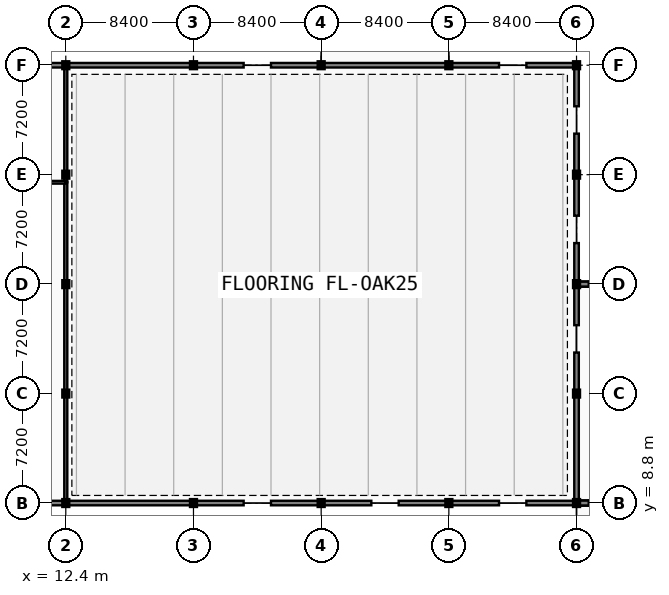
"""IFC4 building model, lengths in metres.
Left out: names, types, materials, properties, quantities, classifications, styles, units other than length and angle.
Written with IfcOpenShell. Run it as: python <this file> out.ifc"""

import sys

from ifc_helpers import new_model, si_unit, direction, frame, frame_2d, origin, origin_2d, place, context, subcontext, project, spatial, rectangle, i_section, extrude, element, fill, save


model = new_model("IFC4")
c1 = context("Model", 3, precision=1e-05, world=origin(), true_north=direction((0.0, 1.0)))
c2 = subcontext(c1, "Body", "Model", "MODEL_VIEW")
j1 = project(units=[si_unit("LENGTHUNIT", "METRE"), si_unit("PLANEANGLEUNIT", "RADIAN")], contexts=[c1])
p1 = place(None, origin())
s1 = spatial("IfcSite", under=j1, at=p1, CompositionType="ELEMENT")
p2 = place(p1, origin())
s2 = spatial("IfcBuilding", under=s1, at=p2, CompositionType="ELEMENT")
p3 = place(p2, frame((0.0, 0.0, 5.4)))
s3 = spatial("IfcBuildingStorey", under=s2, at=p3, CompositionType="ELEMENT", Elevation=5.4)
for number, where, z_axis, x_axis in (
    (1, (12.4, 8.8, 0.0), (0.0, 0.0, 1.0), (1.0, 0.0, 0.0)),
    (2, (12.4, 16.0, 0.0), (0.0, 0.0, 1.0), (1.0, 0.0, 0.0)),
    (3, (12.4, 23.2, 0.0), (0.0, 0.0, 1.0), (1.0, 0.0, 0.0)),
    (4, (12.4, 30.4, 0.0), (0.0, 0.0, 1.0), (1.0, 0.0, 0.0)),
    (5, (12.4, 37.6, 0.0), (0.0, 0.0, 1.0), (1.0, 0.0, 0.0)),
    (6, (20.8, 8.8, 0.0), (0.0, 0.0, 1.0), (1.0, 0.0, 0.0)),
    (7, (20.8, 37.6, 0.0), (0.0, 0.0, 1.0), (1.0, 0.0, 0.0)),
    (8, (29.2, 8.8, 0.0), (0.0, 0.0, 1.0), (1.0, 0.0, 0.0)),
    (9, (29.2, 37.6, 0.0), (0.0, 0.0, 1.0), (1.0, 0.0, 0.0)),
    (10, (37.6, 8.8, 0.0), (0.0, 0.0, 1.0), (1.0, 0.0, 0.0)),
    (11, (37.6, 37.6, 0.0), (0.0, 0.0, 1.0), (1.0, 0.0, 0.0)),
    (12, (46.0, 8.8, 0.0), (0.0, 0.0, 1.0), (1.0, 0.0, 0.0)),
    (13, (46.0, 16.0, 0.0), (0.0, 0.0, 1.0), (1.0, 0.0, 0.0)),
    (14, (46.0, 23.2, 0.0), (0.0, 0.0, 1.0), (1.0, 0.0, 0.0)),
    (15, (46.0, 30.4, 0.0), (0.0, 0.0, 1.0), (1.0, 0.0, 0.0)),
    (16, (46.0, 37.6, 0.0), (0.0, 0.0, 1.0), (1.0, 0.0, 0.0)),
):
    element("IfcColumn", number, at=place(p3, frame(where, z_axis=z_axis, x_axis=x_axis)), inside=s3, PredefinedType="COLUMN", context=c2, shape_type="SweptSolid", body=[
        extrude(i_section(OverallWidth=0.3, OverallDepth=0.36, WebThickness=0.012, FlangeThickness=0.022, at=origin_2d()), origin(), (0.0, 0.0, 1.0), 4.2),
    ])
p4 = place(p3, frame((12.4, 8.96, 0.0), z_axis=(0.0, 0.0, 1.0), x_axis=(0.0, 1.0, 0.0)))
e17 = element("IfcWall", 17, at=p4, inside=s3, PredefinedType="PARTITIONING", context=c2, shape_type="SweptSolid", body=[
    extrude(rectangle(XDim=20.94, YDim=0.2, at=frame_2d((10.47, 0.0))), origin(), (0.0, 0.0, 1.0), 3.35),
])
p5 = place(p4, frame((8.613, 0.0, -0.01)))
e18 = element("IfcOpeningElement", 18, at=p5, cuts=e17, PredefinedType="OPENING", context=c2, shape_type="SweptSolid", body=[
    extrude(rectangle(XDim=1.8, YDim=2.26, at=frame_2d((0.9, 1.13))), frame((0.0, 0.11, 0.0), z_axis=(0.0, -1.0, 0.0), x_axis=(1.0, 0.0, 0.0)), (0.0, 0.0, 1.0), 0.22),
])
p6 = place(p3, frame((12.4, 29.9, 0.0), z_axis=(0.0, 0.0, 1.0), x_axis=(0.0, 1.0, 0.0)))
e19 = element("IfcWall", 19, at=p6, inside=s3, PredefinedType="PARTITIONING", context=c2, shape_type="SweptSolid", body=[
    extrude(rectangle(XDim=7.56, YDim=0.2, at=frame_2d((3.78, 0.0))), origin(), (0.0, 0.0, 1.0), 3.23),
])
p7 = place(p3, frame((8.3, 29.9, 0.0), z_axis=(0.0, 0.0, 1.0), x_axis=(1.0, 0.0, 0.0)))
e20 = element("IfcWall", 20, at=p7, inside=s3, PredefinedType="PARTITIONING", context=c2, shape_type="SweptSolid", body=[
    extrude(rectangle(XDim=4.1, YDim=0.18, at=frame_2d((2.05, 0.0))), origin(), (0.0, 0.0, 1.0), 3.35),
])
p8 = place(p7, frame((1.55, 0.0, -0.01)))
e21 = element("IfcOpeningElement", 21, at=p8, cuts=e20, PredefinedType="OPENING", context=c2, shape_type="SweptSolid", body=[
    extrude(rectangle(XDim=1.0, YDim=2.16, at=frame_2d((0.5, 1.08))), frame((0.0, 0.1, 0.0), z_axis=(0.0, -1.0, 0.0), x_axis=(1.0, 0.0, 0.0)), (0.0, 0.0, 1.0), 0.2),
])
p9 = place(p3, frame((4.0, 8.8, 0.0), z_axis=(0.0, 0.0, 1.0), x_axis=(1.0, 0.0, 0.0)))
e22 = element("IfcWall", 22, at=p9, inside=s3, PredefinedType="SOLIDWALL", context=c2, shape_type="SweptSolid", body=[
    extrude(rectangle(XDim=8.4, YDim=0.3, at=frame_2d((4.2, 0.0))), origin(), (0.0, 0.0, 1.0), 3.35),
])
p10 = place(p9, frame((0.46, 0.0, 0.85)))
e23 = element("IfcOpeningElement", 23, at=p10, cuts=e22, PredefinedType="OPENING", context=c2, shape_type="SweptSolid", body=[
    extrude(rectangle(XDim=0.9, YDim=2.15, at=frame_2d((0.45, 1.075))), frame((0.0, 0.16, 0.0), z_axis=(0.0, -1.0, 0.0), x_axis=(1.0, 0.0, 0.0)), (0.0, 0.0, 1.0), 0.32),
])
p11 = place(p9, frame((6.86, 0.0, 0.85)))
e24 = element("IfcOpeningElement", 24, at=p11, cuts=e22, PredefinedType="OPENING", context=c2, shape_type="SweptSolid", body=[
    extrude(rectangle(XDim=0.9, YDim=2.15, at=frame_2d((0.45, 1.075))), frame((0.0, 0.16, 0.0), z_axis=(0.0, -1.0, 0.0), x_axis=(1.0, 0.0, 0.0)), (0.0, 0.0, 1.0), 0.32),
])
p12 = place(p3, frame((12.4, 8.8, 0.0), z_axis=(0.0, 0.0, 1.0), x_axis=(1.0, 0.0, 0.0)))
e25 = element("IfcWall", 25, at=p12, inside=s3, PredefinedType="SOLIDWALL", context=c2, shape_type="SweptSolid", body=[
    extrude(rectangle(XDim=8.4, YDim=0.3, at=frame_2d((4.2, 0.0))), origin(), (0.0, 0.0, 1.0), 3.35),
])
p13 = place(p12, frame((0.46, 0.0, 0.85)))
e26 = element("IfcOpeningElement", 26, at=p13, cuts=e25, PredefinedType="OPENING", context=c2, shape_type="SweptSolid", body=[
    extrude(rectangle(XDim=0.9, YDim=2.15, at=frame_2d((0.45, 1.075))), frame((0.0, 0.16, 0.0), z_axis=(0.0, -1.0, 0.0), x_axis=(1.0, 0.0, 0.0)), (0.0, 0.0, 1.0), 0.32),
])
p14 = place(p12, frame((6.86, 0.0, 0.85)))
e27 = element("IfcOpeningElement", 27, at=p14, cuts=e25, PredefinedType="OPENING", context=c2, shape_type="SweptSolid", body=[
    extrude(rectangle(XDim=0.9, YDim=2.15, at=frame_2d((0.45, 1.075))), frame((0.0, 0.16, 0.0), z_axis=(0.0, -1.0, 0.0), x_axis=(1.0, 0.0, 0.0)), (0.0, 0.0, 1.0), 0.32),
])
for number, where, z_axis, x_axis in (
    (28, (20.8, 8.8, 0.0), (0.0, 0.0, 1.0), (1.0, 0.0, 0.0)),
    (29, (25.9, 8.8, 0.0), (0.0, 0.0, 1.0), (1.0, 0.0, 0.0)),
    (30, (29.2, 8.8, 0.0), (0.0, 0.0, 1.0), (1.0, 0.0, 0.0)),
    (31, (34.3, 8.8, 0.0), (0.0, 0.0, 1.0), (1.0, 0.0, 0.0)),
):
    element("IfcWall", number, at=place(p3, frame(where, z_axis=z_axis, x_axis=x_axis)), inside=s3, PredefinedType="SOLIDWALL", context=c2, shape_type="SweptSolid", body=[
        extrude(rectangle(XDim=3.3, YDim=0.3, at=frame_2d((1.65, 0.0))), origin(), (0.0, 0.0, 1.0), 4.2),
    ])
p15 = place(p3, frame((37.6, 8.8, 0.0), z_axis=(0.0, 0.0, 1.0), x_axis=(1.0, 0.0, 0.0)))
e32 = element("IfcWall", 32, at=p15, inside=s3, PredefinedType="SOLIDWALL", context=c2, shape_type="SweptSolid", body=[
    extrude(rectangle(XDim=3.3, YDim=0.3, at=frame_2d((1.65, 0.0))), origin(), (0.0, 0.0, 1.0), 4.2),
])
p16 = place(p3, frame((42.7, 8.8, 0.0), z_axis=(0.0, 0.0, 1.0), x_axis=(1.0, 0.0, 0.0)))
e33 = element("IfcWall", 33, at=p16, inside=s3, PredefinedType="SOLIDWALL", context=c2, shape_type="SweptSolid", body=[
    extrude(rectangle(XDim=3.3, YDim=0.3, at=frame_2d((1.65, 0.0))), origin(), (0.0, 0.0, 1.0), 4.2),
])
p17 = place(p3, frame((12.4, 37.6, 0.0), z_axis=(0.0, 0.0, 1.0), x_axis=(-1.0, 0.0, 0.0)))
e34 = element("IfcWall", 34, at=p17, inside=s3, PredefinedType="SOLIDWALL", context=c2, shape_type="SweptSolid", body=[
    extrude(rectangle(XDim=8.4, YDim=0.3, at=frame_2d((4.2, 0.0))), origin(), (0.0, 0.0, 1.0), 3.35),
])
p18 = place(p17, frame((0.46, 0.0, 0.85)))
e35 = element("IfcOpeningElement", 35, at=p18, cuts=e34, PredefinedType="OPENING", context=c2, shape_type="SweptSolid", body=[
    extrude(rectangle(XDim=0.9, YDim=2.15, at=frame_2d((0.45, 1.075))), frame((0.0, 0.16, 0.0), z_axis=(0.0, -1.0, 0.0), x_axis=(1.0, 0.0, 0.0)), (0.0, 0.0, 1.0), 0.32),
])
p19 = place(p17, frame((6.86, 0.0, 0.85)))
e36 = element("IfcOpeningElement", 36, at=p19, cuts=e34, PredefinedType="OPENING", context=c2, shape_type="SweptSolid", body=[
    extrude(rectangle(XDim=0.9, YDim=2.15, at=frame_2d((0.45, 1.075))), frame((0.0, 0.16, 0.0), z_axis=(0.0, -1.0, 0.0), x_axis=(1.0, 0.0, 0.0)), (0.0, 0.0, 1.0), 0.32),
])
p20 = place(p3, frame((20.8, 37.6, 0.0), z_axis=(0.0, 0.0, 1.0), x_axis=(-1.0, 0.0, 0.0)))
e37 = element("IfcWall", 37, at=p20, inside=s3, PredefinedType="SOLIDWALL", context=c2, shape_type="SweptSolid", body=[
    extrude(rectangle(XDim=8.4, YDim=0.3, at=frame_2d((4.2, 0.0))), origin(), (0.0, 0.0, 1.0), 3.35),
])
p21 = place(p20, frame((0.46, 0.0, 0.85)))
e38 = element("IfcOpeningElement", 38, at=p21, cuts=e37, PredefinedType="OPENING", context=c2, shape_type="SweptSolid", body=[
    extrude(rectangle(XDim=0.9, YDim=2.15, at=frame_2d((0.45, 1.075))), frame((0.0, 0.16, 0.0), z_axis=(0.0, -1.0, 0.0), x_axis=(1.0, 0.0, 0.0)), (0.0, 0.0, 1.0), 0.32),
])
p22 = place(p20, frame((6.86, 0.0, 0.85)))
e39 = element("IfcOpeningElement", 39, at=p22, cuts=e37, PredefinedType="OPENING", context=c2, shape_type="SweptSolid", body=[
    extrude(rectangle(XDim=0.9, YDim=2.15, at=frame_2d((0.45, 1.075))), frame((0.0, 0.16, 0.0), z_axis=(0.0, -1.0, 0.0), x_axis=(1.0, 0.0, 0.0)), (0.0, 0.0, 1.0), 0.32),
])
for number, where, z_axis, x_axis in (
    (40, (29.2, 37.6, 0.0), (0.0, 0.0, 1.0), (-1.0, 0.0, 0.0)),
    (41, (24.1, 37.6, 0.0), (0.0, 0.0, 1.0), (-1.0, 0.0, 0.0)),
):
    element("IfcWall", number, at=place(p3, frame(where, z_axis=z_axis, x_axis=x_axis)), inside=s3, PredefinedType="SOLIDWALL", context=c2, shape_type="SweptSolid", body=[
        extrude(rectangle(XDim=3.3, YDim=0.3, at=frame_2d((1.65, 0.0))), origin(), (0.0, 0.0, 1.0), 4.2),
    ])
p23 = place(p3, frame((37.6, 37.6, 0.0), z_axis=(0.0, 0.0, 1.0), x_axis=(-1.0, 0.0, 0.0)))
e42 = element("IfcWall", 42, at=p23, inside=s3, PredefinedType="SOLIDWALL", context=c2, shape_type="SweptSolid", body=[
    extrude(rectangle(XDim=8.4, YDim=0.3, at=frame_2d((4.2, 0.0))), origin(), (0.0, 0.0, 1.0), 3.21),
])
p24 = place(p23, frame((3.6, 0.0, -0.01)))
e43 = element("IfcOpeningElement", 43, at=p24, cuts=e42, PredefinedType="OPENING", context=c2, shape_type="SweptSolid", body=[
    extrude(rectangle(XDim=1.2, YDim=2.21, at=frame_2d((0.6, 1.105))), frame((0.0, 0.16, 0.0), z_axis=(0.0, -1.0, 0.0), x_axis=(1.0, 0.0, 0.0)), (0.0, 0.0, 1.0), 0.32),
])
p25 = place(p3, frame((46.0, 37.6, 0.0), z_axis=(0.0, 0.0, 1.0), x_axis=(-1.0, 0.0, 0.0)))
e44 = element("IfcWall", 44, at=p25, inside=s3, PredefinedType="SOLIDWALL", context=c2, shape_type="SweptSolid", body=[
    extrude(rectangle(XDim=3.3, YDim=0.3, at=frame_2d((1.65, 0.0))), origin(), (0.0, 0.0, 1.0), 4.2),
])
p26 = place(p3, frame((40.9, 37.6, 0.0), z_axis=(0.0, 0.0, 1.0), x_axis=(-1.0, 0.0, 0.0)))
e45 = element("IfcWall", 45, at=p26, inside=s3, PredefinedType="SOLIDWALL", context=c2, shape_type="SweptSolid", body=[
    extrude(rectangle(XDim=3.3, YDim=0.3, at=frame_2d((1.65, 0.0))), origin(), (0.0, 0.0, 1.0), 4.2),
])
p27 = place(p3, frame((46.0, 8.8, 0.0), z_axis=(0.0, 0.0, 1.0), x_axis=(0.0, 1.0, 0.0)))
e46 = element("IfcWall", 46, at=p27, inside=s3, PredefinedType="SOLIDWALL", context=c2, shape_type="SweptSolid", body=[
    extrude(rectangle(XDim=7.2, YDim=0.3, at=frame_2d((3.6, 0.0))), origin(), (0.0, 0.0, 1.0), 3.21),
])
p28 = place(p27, frame((3.0, 0.0, -0.01)))
e47 = element("IfcOpeningElement", 47, at=p28, cuts=e46, PredefinedType="OPENING", context=c2, shape_type="SweptSolid", body=[
    extrude(rectangle(XDim=1.2, YDim=2.21, at=frame_2d((0.6, 1.105))), frame((0.0, 0.16, 0.0), z_axis=(0.0, -1.0, 0.0), x_axis=(1.0, 0.0, 0.0)), (0.0, 0.0, 1.0), 0.32),
])
for number, where, z_axis, x_axis in (
    (48, (46.0, 16.0, 0.0), (0.0, 0.0, 1.0), (0.0, 1.0, 0.0)),
    (49, (46.0, 20.5, 0.0), (0.0, 0.0, 1.0), (0.0, 1.0, 0.0)),
):
    element("IfcWall", number, at=place(p3, frame(where, z_axis=z_axis, x_axis=x_axis)), inside=s3, PredefinedType="SOLIDWALL", context=c2, shape_type="SweptSolid", body=[
        extrude(rectangle(XDim=2.7, YDim=0.3, at=frame_2d((1.35, 0.0))), origin(), (0.0, 0.0, 1.0), 3.21),
    ])
for number, where, z_axis, x_axis in (
    (50, (46.0, 23.2, 0.0), (0.0, 0.0, 1.0), (0.0, 1.0, 0.0)),
    (51, (46.0, 27.7, 0.0), (0.0, 0.0, 1.0), (0.0, 1.0, 0.0)),
):
    element("IfcWall", number, at=place(p3, frame(where, z_axis=z_axis, x_axis=x_axis)), inside=s3, PredefinedType="SOLIDWALL", context=c2, shape_type="SweptSolid", body=[
        extrude(rectangle(XDim=2.7, YDim=0.3, at=frame_2d((1.35, 0.0))), origin(), (0.0, 0.0, 1.0), 4.2),
    ])
for number, where, z_axis, x_axis in (
    (52, (46.0, 30.4, 0.0), (0.0, 0.0, 1.0), (0.0, 1.0, 0.0)),
    (53, (46.0, 34.9, 0.0), (0.0, 0.0, 1.0), (0.0, 1.0, 0.0)),
):
    element("IfcWall", number, at=place(p3, frame(where, z_axis=z_axis, x_axis=x_axis)), inside=s3, PredefinedType="SOLIDWALL", context=c2, shape_type="SweptSolid", body=[
        extrude(rectangle(XDim=2.7, YDim=0.3, at=frame_2d((1.35, 0.0))), origin(), (0.0, 0.0, 1.0), 4.2),
    ])
p29 = place(p3, frame((46.0, 8.8, 0.0), z_axis=(0.0, 0.0, 1.0), x_axis=(1.0, 0.0, 0.0)))
e54 = element("IfcWall", 54, at=p29, inside=s3, PredefinedType="PARAPET", context=c2, shape_type="SweptSolid", body=[
    extrude(rectangle(XDim=1.15, YDim=0.32, at=frame_2d((0.575, 0.0))), origin(), (0.0, 0.0, 1.0), 3.21),
])
p30 = place(p3, frame((46.0, 8.8, 3.45), z_axis=(0.0, 0.0, 1.0), x_axis=(1.0, 0.0, 0.0)))
e55 = element("IfcWall", 55, at=p30, inside=s3, PredefinedType="PARAPET", context=c2, shape_type="SweptSolid", body=[
    extrude(rectangle(XDim=4.8, YDim=0.32, at=frame_2d((2.4, 0.0))), origin(), (0.0, 0.0, 1.0), 0.8),
])
p31 = place(p3, frame((46.0, 8.8, 4.25), z_axis=(0.0, 0.0, 1.0), x_axis=(1.0, 0.0, 0.0)))
e56 = element("IfcWall", 56, at=p31, inside=s3, PredefinedType="PARAPET", context=c2, shape_type="SweptSolid", body=[
    extrude(rectangle(XDim=4.8, YDim=0.32, at=frame_2d((2.4, 0.0))), origin(), (0.0, 0.0, 1.0), 0.6),
])
p32 = place(p3, frame((46.0, 23.2, 0.0), z_axis=(0.0, 0.0, 1.0), x_axis=(1.0, 0.0, 0.0)))
e57 = element("IfcWall", 57, at=p32, inside=s3, PredefinedType="PARAPET", context=c2, shape_type="SweptSolid", body=[
    extrude(rectangle(XDim=1.15, YDim=0.32, at=frame_2d((0.575, 0.0))), origin(), (0.0, 0.0, 1.0), 3.21),
])
p33 = place(p3, frame((46.0, 23.2, 3.45), z_axis=(0.0, 0.0, 1.0), x_axis=(1.0, 0.0, 0.0)))
e58 = element("IfcWall", 58, at=p33, inside=s3, PredefinedType="PARAPET", context=c2, shape_type="SweptSolid", body=[
    extrude(rectangle(XDim=4.8, YDim=0.32, at=frame_2d((2.4, 0.0))), origin(), (0.0, 0.0, 1.0), 0.8),
])
p34 = place(p3, frame((46.0, 23.2, 4.25), z_axis=(0.0, 0.0, 1.0), x_axis=(1.0, 0.0, 0.0)))
e59 = element("IfcWall", 59, at=p34, inside=s3, PredefinedType="PARAPET", context=c2, shape_type="SweptSolid", body=[
    extrude(rectangle(XDim=4.8, YDim=0.32, at=frame_2d((2.4, 0.0))), origin(), (0.0, 0.0, 1.0), 0.6),
])
p35 = place(p5, frame((1.8, 0.0, 0.01), z_axis=(0.0, 0.0, 1.0), x_axis=(-1.0, 0.0, 0.0)))
e60 = element("IfcDoor", 60, at=p35, inside=s3, OperationType="DOUBLE_SWING_LEFT", PredefinedType="DOOR", context=c2, shape_type="SweptSolid", body=[
    extrude(rectangle(XDim=1.8, YDim=2.25, at=frame_2d((0.9, 1.125))), frame((0.0, 0.025, 0.0), z_axis=(0.0, -1.0, 0.0), x_axis=(1.0, 0.0, 0.0)), (0.0, 0.0, 1.0), 0.05),
])
fill(e18, e60)
p36 = place(p11, origin())
e61 = element("IfcWindow", 61, at=p36, inside=s3, PartitioningType="SINGLE_PANEL", PredefinedType="WINDOW", context=c2, shape_type="SweptSolid", body=[
    extrude(rectangle(XDim=0.9, YDim=2.15, at=frame_2d((0.45, 1.075))), frame((0.0, 0.03, 0.0), z_axis=(0.0, -1.0, 0.0), x_axis=(1.0, 0.0, 0.0)), (0.0, 0.0, 1.0), 0.06),
])
fill(e24, e61)
p37 = place(p13, origin())
e62 = element("IfcWindow", 62, at=p37, inside=s3, PartitioningType="SINGLE_PANEL", PredefinedType="WINDOW", context=c2, shape_type="SweptSolid", body=[
    extrude(rectangle(XDim=0.9, YDim=2.15, at=frame_2d((0.45, 1.075))), frame((0.0, 0.03, 0.0), z_axis=(0.0, -1.0, 0.0), x_axis=(1.0, 0.0, 0.0)), (0.0, 0.0, 1.0), 0.06),
])
fill(e26, e62)
p38 = place(p14, origin())
e63 = element("IfcWindow", 63, at=p38, inside=s3, PartitioningType="SINGLE_PANEL", PredefinedType="WINDOW", context=c2, shape_type="SweptSolid", body=[
    extrude(rectangle(XDim=0.9, YDim=2.15, at=frame_2d((0.45, 1.075))), frame((0.0, 0.03, 0.0), z_axis=(0.0, -1.0, 0.0), x_axis=(1.0, 0.0, 0.0)), (0.0, 0.0, 1.0), 0.06),
])
fill(e27, e63)
p39 = place(p18, origin())
e64 = element("IfcWindow", 64, at=p39, inside=s3, PartitioningType="SINGLE_PANEL", PredefinedType="WINDOW", context=c2, shape_type="SweptSolid", body=[
    extrude(rectangle(XDim=0.9, YDim=2.15, at=frame_2d((0.45, 1.075))), frame((0.0, 0.03, 0.0), z_axis=(0.0, -1.0, 0.0), x_axis=(1.0, 0.0, 0.0)), (0.0, 0.0, 1.0), 0.06),
])
fill(e35, e64)
p40 = place(p21, origin())
e65 = element("IfcWindow", 65, at=p40, inside=s3, PartitioningType="SINGLE_PANEL", PredefinedType="WINDOW", context=c2, shape_type="SweptSolid", body=[
    extrude(rectangle(XDim=0.9, YDim=2.15, at=frame_2d((0.45, 1.075))), frame((0.0, 0.03, 0.0), z_axis=(0.0, -1.0, 0.0), x_axis=(1.0, 0.0, 0.0)), (0.0, 0.0, 1.0), 0.06),
])
fill(e38, e65)
p41 = place(p22, origin())
e66 = element("IfcWindow", 66, at=p41, inside=s3, PartitioningType="SINGLE_PANEL", PredefinedType="WINDOW", context=c2, shape_type="SweptSolid", body=[
    extrude(rectangle(XDim=0.9, YDim=2.15, at=frame_2d((0.45, 1.075))), frame((0.0, 0.03, 0.0), z_axis=(0.0, -1.0, 0.0), x_axis=(1.0, 0.0, 0.0)), (0.0, 0.0, 1.0), 0.06),
])
fill(e39, e66)
p42 = place(p24, frame((0.0, 0.0, 0.01)))
e67 = element("IfcDoor", 67, at=p42, inside=s3, OperationType="SINGLE_SWING_LEFT", PredefinedType="DOOR", context=c2, shape_type="SweptSolid", body=[
    extrude(rectangle(XDim=1.2, YDim=2.2, at=frame_2d((0.6, 1.1))), frame((0.0, 0.025, 0.0), z_axis=(0.0, -1.0, 0.0), x_axis=(1.0, 0.0, 0.0)), (0.0, 0.0, 1.0), 0.05),
])
fill(e43, e67)
p43 = place(p28, frame((0.0, 0.0, 0.01)))
e68 = element("IfcDoor", 68, at=p43, inside=s3, OperationType="SINGLE_SWING_RIGHT", PredefinedType="DOOR", context=c2, shape_type="SweptSolid", body=[
    extrude(rectangle(XDim=1.2, YDim=2.2, at=frame_2d((0.6, 1.1))), frame((0.0, 0.025, 0.0), z_axis=(0.0, -1.0, 0.0), x_axis=(1.0, 0.0, 0.0)), (0.0, 0.0, 1.0), 0.05),
])
fill(e47, e68)
save(model, sys.argv[1])
